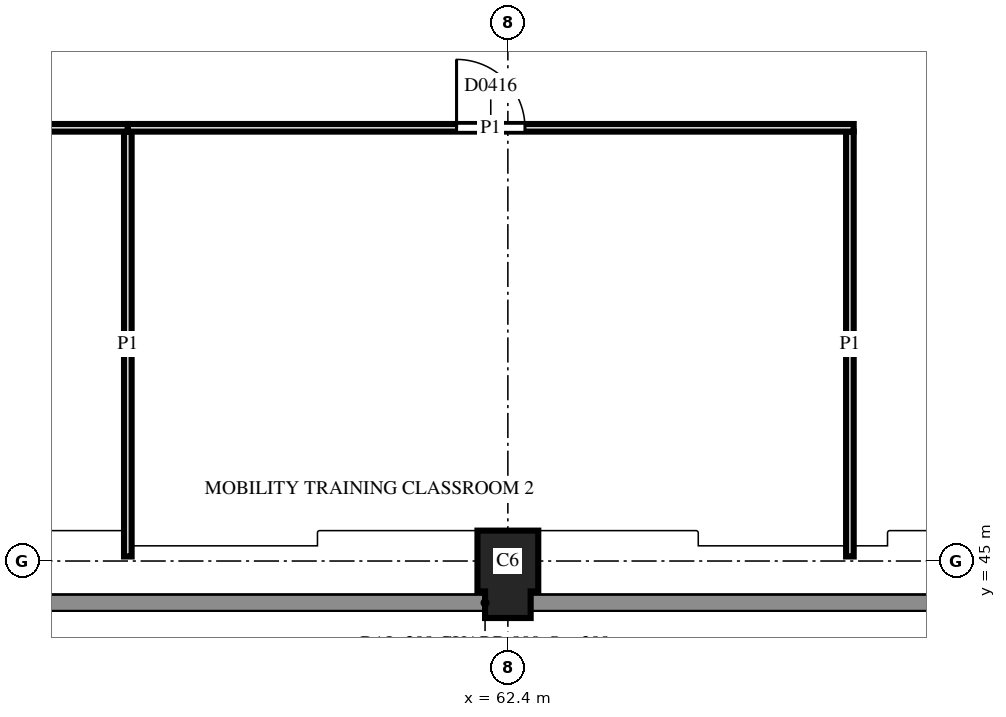
"""IFC4 building model, lengths in metres.
Left out: names, types, materials, properties, quantities, classifications, styles, units other than length and angle.
Written with IfcOpenShell. Run it as: python <this file> out.ifc"""

import sys

from ifc_helpers import new_model, si_unit, direction, frame, frame_2d, origin, place, context, subcontext, project, spatial, polyline, rectangle, outline, extrude, element, fill, save


model = new_model("IFC4")
c1 = context("Model", 3, precision=1e-05, world=origin(), true_north=direction((0.0, 1.0)))
c2 = subcontext(c1, "Body", "Model", "MODEL_VIEW")
j1 = project(units=[si_unit("LENGTHUNIT", "METRE"), si_unit("PLANEANGLEUNIT", "RADIAN")], contexts=[c1])
p1 = place(None, origin())
s1 = spatial("IfcSite", under=j1, at=p1, CompositionType="ELEMENT")
p2 = place(p1, origin())
s2 = spatial("IfcBuilding", under=s1, at=p2, CompositionType="ELEMENT")
p3 = place(p2, frame((0.0, 0.0, 15.6)))
s3 = spatial("IfcBuildingStorey", under=s2, at=p3, CompositionType="ELEMENT", Elevation=15.6)
p4 = place(p3, frame((62.4, 45.0, 0.0), z_axis=(0.0, 0.0, 1.0), x_axis=(0.0, -1.0, 0.0)))
e1 = element("IfcColumn", 1, at=p4, inside=s3, PredefinedType="COLUMN", context=c2, shape_type="SweptSolid", body=[
    extrude(outline(polyline([(-0.4, -0.4), (0.4, -0.4), (0.4, -0.3), (0.75, -0.3), (0.75, 0.3), (0.4, 0.3), (0.4, 0.4), (-0.4, 0.4), (-0.4, -0.4)])), origin(), (0.0, 0.0, 1.0), 3.7),
])
for number, where, z_axis, x_axis in (
    (2, (57.4, 45.06, 0.0), (0.0, 0.0, 1.0), (0.0, 1.0, 0.0)),
    (3, (66.9, 45.06, 0.0), (0.0, 0.0, 1.0), (0.0, 1.0, 0.0)),
):
    element("IfcWall", number, at=place(p3, frame(where, z_axis=z_axis, x_axis=x_axis)), inside=s3, PredefinedType="PARTITIONING", context=c2, shape_type="SweptSolid", body=[
        extrude(rectangle(XDim=5.59, YDim=0.1, at=frame_2d((2.795, 0.0))), origin(), (0.0, 0.0, 1.0), 2.88),
    ])
p5 = place(p3, frame((57.4, 50.7, 0.0), z_axis=(0.0, 0.0, 1.0), x_axis=(-1.0, 0.0, 0.0)))
e4 = element("IfcWall", 4, at=p5, inside=s3, PredefinedType="PARTITIONING", context=c2, shape_type="SweptSolid", body=[
    extrude(rectangle(XDim=10.0, YDim=0.1, at=frame_2d((5.0, 0.0))), origin(), (0.0, 0.0, 1.0), 2.88),
])
p6 = place(p5, frame((4.55, 0.0, 0.0)))
e5 = element("IfcOpeningElement", 5, at=p6, cuts=e4, PredefinedType="OPENING", context=c2, shape_type="SweptSolid", body=[
    extrude(rectangle(XDim=0.9, YDim=2.1, at=frame_2d((0.45, 1.05))), frame((0.0, 0.06, 0.0), z_axis=(0.0, -1.0, 0.0), x_axis=(1.0, 0.0, 0.0)), (0.0, 0.0, 1.0), 0.12),
])
p7 = place(p3, frame((66.95, 50.7, 0.0), z_axis=(0.0, 0.0, 1.0), x_axis=(-1.0, 0.0, 0.0)))
e6 = element("IfcWall", 6, at=p7, inside=s3, PredefinedType="PARTITIONING", context=c2, shape_type="SweptSolid", body=[
    extrude(rectangle(XDim=9.55, YDim=0.1, at=frame_2d((4.775, 0.0))), origin(), (0.0, 0.0, 1.0), 2.88),
])
p8 = place(p7, frame((4.325, 0.0, 0.0)))
e7 = element("IfcOpeningElement", 7, at=p8, cuts=e6, PredefinedType="OPENING", context=c2, shape_type="SweptSolid", body=[
    extrude(rectangle(XDim=0.9, YDim=2.1, at=frame_2d((0.45, 1.05))), frame((0.0, 0.06, 0.0), z_axis=(0.0, -1.0, 0.0), x_axis=(1.0, 0.0, 0.0)), (0.0, 0.0, 1.0), 0.12),
])
p9 = place(p8, origin())
e8 = element("IfcDoor", 8, at=p9, inside=s3, OperationType="SINGLE_SWING_RIGHT", PredefinedType="DOOR", context=c2, shape_type="SweptSolid", body=[
    extrude(rectangle(XDim=0.9, YDim=2.1, at=frame_2d((0.45, 1.05))), frame((0.0, 0.025, 0.0), z_axis=(0.0, -1.0, 0.0), x_axis=(1.0, 0.0, 0.0)), (0.0, 0.0, 1.0), 0.05),
])
fill(e7, e8)
save(model, sys.argv[1])
